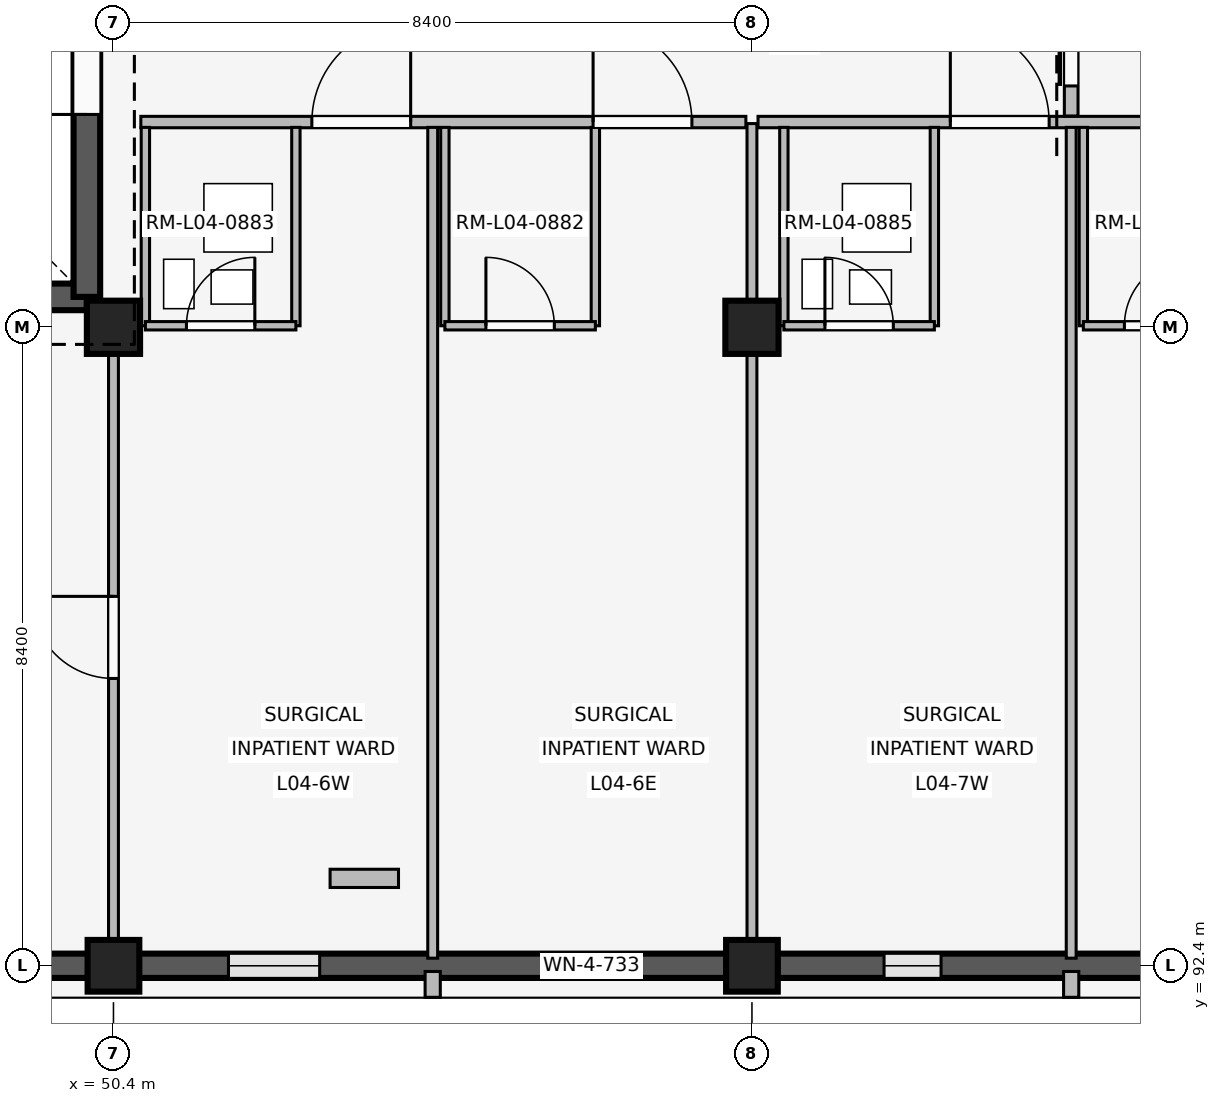
"""IFC4 building model, lengths in metres.
Left out: names, types, materials, properties, quantities, classifications, styles, units other than length and angle.
Written with IfcOpenShell. Run it as: python <this file> out.ifc"""

import sys

from ifc_helpers import new_model, si_unit, direction, frame, frame_2d, origin, origin_2d, place, context, subcontext, project, spatial, rectangle, extrude, element, fill, save


model = new_model("IFC4")
c1 = context("Model", 3, precision=1e-05, world=origin(), true_north=direction((0.0, 1.0)))
c2 = subcontext(c1, "Body", "Model", "MODEL_VIEW")
j1 = project(units=[si_unit("LENGTHUNIT", "METRE"), si_unit("PLANEANGLEUNIT", "RADIAN")], contexts=[c1])
p1 = place(None, origin())
s1 = spatial("IfcSite", under=j1, at=p1, CompositionType="ELEMENT")
p2 = place(p1, origin())
s2 = spatial("IfcBuilding", under=s1, at=p2, CompositionType="ELEMENT")
p3 = place(p2, frame((0.0, 0.0, 16.2)))
s3 = spatial("IfcBuildingStorey", under=s2, at=p3, CompositionType="ELEMENT", Elevation=16.2)
p4 = place(p3, frame((50.4, 92.4, 0.0), z_axis=(0.0, 0.0, 1.0), x_axis=(1.0, 0.0, 0.0)))
e1 = element("IfcColumn", 1, at=p4, inside=s3, PredefinedType="COLUMN", context=c2, shape_type="SweptSolid", body=[
    extrude(rectangle(XDim=0.68, YDim=0.68, at=origin_2d()), origin(), (0.0, 0.0, 1.0), 4.2),
])
p5 = place(p3, frame((50.4, 100.8, 0.0), z_axis=(0.0, 0.0, 1.0), x_axis=(1.0, 0.0, 0.0)))
e2 = element("IfcColumn", 2, at=p5, inside=s3, PredefinedType="COLUMN", context=c2, shape_type="SweptSolid", body=[
    extrude(rectangle(XDim=0.7, YDim=0.7, at=origin_2d()), origin(), (0.0, 0.0, 1.0), 4.2),
])
p6 = place(p3, frame((58.8, 92.4, 0.0), z_axis=(0.0, 0.0, 1.0), x_axis=(1.0, 0.0, 0.0)))
e3 = element("IfcColumn", 3, at=p6, inside=s3, PredefinedType="COLUMN", context=c2, shape_type="SweptSolid", body=[
    extrude(rectangle(XDim=0.68, YDim=0.68, at=origin_2d()), origin(), (0.0, 0.0, 1.0), 4.2),
])
p7 = place(p3, frame((58.8, 100.8, 0.0), z_axis=(0.0, 0.0, 1.0), x_axis=(1.0, 0.0, 0.0)))
e4 = element("IfcColumn", 4, at=p7, inside=s3, PredefinedType="COLUMN", context=c2, shape_type="SweptSolid", body=[
    extrude(rectangle(XDim=0.7, YDim=0.7, at=origin_2d()), origin(), (0.0, 0.0, 1.0), 4.2),
])
p8 = place(p3, frame((50.065, 92.4, 0.0), z_axis=(0.0, 0.0, 1.0), x_axis=(-1.0, 0.0, 0.0)))
e5 = element("IfcWall", 5, at=p8, inside=s3, PredefinedType="SOLIDWALL", context=c2, shape_type="SweptSolid", body=[
    extrude(rectangle(XDim=7.73, YDim=0.32, at=frame_2d((3.865, 0.0))), origin(), (0.0, 0.0, 1.0), 3.32),
])
p9 = place(p8, frame((1.103, 0.0, 0.85)))
e6 = element("IfcOpeningElement", 6, at=p9, cuts=e5, PredefinedType="OPENING", context=c2, shape_type="SweptSolid", body=[
    extrude(rectangle(XDim=1.35, YDim=1.55, at=frame_2d((0.675, 0.775))), frame((0.0, 0.17, 0.0), z_axis=(0.0, -1.0, 0.0), x_axis=(1.0, 0.0, 0.0)), (0.0, 0.0, 1.0), 0.34),
])
p10 = place(p8, frame((5.277, 0.0, 0.85)))
e7 = element("IfcOpeningElement", 7, at=p10, cuts=e5, PredefinedType="OPENING", context=c2, shape_type="SweptSolid", body=[
    extrude(rectangle(XDim=1.35, YDim=1.55, at=frame_2d((0.675, 0.775))), frame((0.0, 0.17, 0.0), z_axis=(0.0, -1.0, 0.0), x_axis=(1.0, 0.0, 0.0)), (0.0, 0.0, 1.0), 0.34),
])
p11 = place(p3, frame((58.465, 92.4, 0.0), z_axis=(0.0, 0.0, 1.0), x_axis=(-1.0, 0.0, 0.0)))
e8 = element("IfcWall", 8, at=p11, inside=s3, PredefinedType="SOLIDWALL", context=c2, shape_type="SweptSolid", body=[
    extrude(rectangle(XDim=7.73, YDim=0.32, at=frame_2d((3.865, 0.0))), origin(), (0.0, 0.0, 1.0), 3.32),
])
p12 = place(p11, frame((1.178, 0.0, 0.85)))
e9 = element("IfcOpeningElement", 9, at=p12, cuts=e8, PredefinedType="OPENING", context=c2, shape_type="SweptSolid", body=[
    extrude(rectangle(XDim=1.2, YDim=1.55, at=frame_2d((0.6, 0.775))), frame((0.0, 0.17, 0.0), z_axis=(0.0, -1.0, 0.0), x_axis=(1.0, 0.0, 0.0)), (0.0, 0.0, 1.0), 0.34),
])
p13 = place(p11, frame((5.352, 0.0, 0.85)))
e10 = element("IfcOpeningElement", 10, at=p13, cuts=e8, PredefinedType="OPENING", context=c2, shape_type="SweptSolid", body=[
    extrude(rectangle(XDim=1.2, YDim=1.55, at=frame_2d((0.6, 0.775))), frame((0.0, 0.17, 0.0), z_axis=(0.0, -1.0, 0.0), x_axis=(1.0, 0.0, 0.0)), (0.0, 0.0, 1.0), 0.34),
])
p14 = place(p3, frame((54.6, 92.325, 0.0), z_axis=(0.0, 0.0, 1.0), x_axis=(0.0, -1.0, 0.0)))
e11 = element("IfcWall", 11, at=p14, inside=s3, PredefinedType="ELEMENTEDWALL", context=c2, shape_type="SweptSolid", body=[
    extrude(rectangle(XDim=0.34, YDim=0.2, at=frame_2d((0.17, 0.0))), origin(), (0.0, 0.0, 1.0), 3.3),
])
p15 = place(p3, frame((66.865, 92.4, 0.0), z_axis=(0.0, 0.0, 1.0), x_axis=(-1.0, 0.0, 0.0)))
e12 = element("IfcWall", 12, at=p15, inside=s3, PredefinedType="SOLIDWALL", context=c2, shape_type="SweptSolid", body=[
    extrude(rectangle(XDim=7.73, YDim=0.32, at=frame_2d((3.865, 0.0))), origin(), (0.0, 0.0, 1.0), 3.32),
])
p16 = place(p15, frame((1.403, 0.0, 0.85)))
e13 = element("IfcOpeningElement", 13, at=p16, cuts=e12, PredefinedType="OPENING", context=c2, shape_type="SweptSolid", body=[
    extrude(rectangle(XDim=0.75, YDim=1.85, at=frame_2d((0.375, 0.925))), frame((0.0, 0.17, 0.0), z_axis=(0.0, -1.0, 0.0), x_axis=(1.0, 0.0, 0.0)), (0.0, 0.0, 1.0), 0.34),
])
p17 = place(p15, frame((5.577, 0.0, 0.85)))
e14 = element("IfcOpeningElement", 14, at=p17, cuts=e12, PredefinedType="OPENING", context=c2, shape_type="SweptSolid", body=[
    extrude(rectangle(XDim=0.75, YDim=1.85, at=frame_2d((0.375, 0.925))), frame((0.0, 0.17, 0.0), z_axis=(0.0, -1.0, 0.0), x_axis=(1.0, 0.0, 0.0)), (0.0, 0.0, 1.0), 0.34),
])
p18 = place(p3, frame((63.0, 92.325, 0.0), z_axis=(0.0, 0.0, 1.0), x_axis=(0.0, -1.0, 0.0)))
e15 = element("IfcWall", 15, at=p18, inside=s3, PredefinedType="ELEMENTEDWALL", context=c2, shape_type="SweptSolid", body=[
    extrude(rectangle(XDim=0.34, YDim=0.2, at=frame_2d((0.17, 0.0))), origin(), (0.0, 0.0, 1.0), 3.3),
])
p19 = place(p3, frame((42.55, 101.2, 0.0), z_axis=(0.0, 0.0, 1.0), x_axis=(1.0, 0.0, 0.0)))
e16 = element("IfcWall", 16, at=p19, inside=s3, PredefinedType="SHEAR", context=c2, shape_type="SweptSolid", body=[
    extrude(rectangle(XDim=7.5, YDim=0.35, at=frame_2d((3.75, 0.0))), origin(), (0.0, 0.0, 1.0), 3.92),
])
p20 = place(p19, frame((4.85, 0.0, 0.0)))
e17 = element("IfcOpeningElement", 17, at=p20, cuts=e16, PredefinedType="OPENING", context=c2, shape_type="SweptSolid", body=[
    extrude(rectangle(XDim=1.2, YDim=2.2, at=frame_2d((0.6, 1.1))), frame((0.0, 0.185, 0.0), z_axis=(0.0, -1.0, 0.0), x_axis=(1.0, 0.0, 0.0)), (0.0, 0.0, 1.0), 0.37),
])
p21 = place(p3, frame((50.05, 101.2, 0.0), z_axis=(0.0, 0.0, 1.0), x_axis=(0.0, 1.0, 0.0)))
e18 = element("IfcWall", 18, at=p21, inside=s3, PredefinedType="SHEAR", context=c2, shape_type="SweptSolid", body=[
    extrude(rectangle(XDim=7.55, YDim=0.35, at=frame_2d((3.775, 0.0))), origin(), (0.0, 0.0, 1.0), 3.92),
])
p22 = place(p21, frame((2.4, 0.0, 0.0)))
e19 = element("IfcOpeningElement", 19, at=p22, cuts=e18, PredefinedType="OPENING", context=c2, shape_type="SweptSolid", body=[
    extrude(rectangle(XDim=1.2, YDim=2.2, at=frame_2d((0.6, 1.1))), frame((0.0, 0.185, 0.0), z_axis=(0.0, -1.0, 0.0), x_axis=(1.0, 0.0, 0.0)), (0.0, 0.0, 1.0), 0.37),
])
p23 = place(p3, frame((50.4, 92.54, 0.0), z_axis=(0.0, 0.0, 1.0), x_axis=(0.0, 1.0, 0.0)))
e20 = element("IfcWall", 20, at=p23, inside=s3, PredefinedType="PARTITIONING", context=c2, shape_type="SweptSolid", body=[
    extrude(rectangle(XDim=8.21, YDim=0.13, at=frame_2d((4.105, 0.0))), origin(), (0.0, 0.0, 1.0), 3.3),
])
p24 = place(p23, frame((3.64, 0.0, 0.0)))
e21 = element("IfcOpeningElement", 21, at=p24, cuts=e20, PredefinedType="OPENING", context=c2, shape_type="SweptSolid", body=[
    extrude(rectangle(XDim=1.08, YDim=2.15, at=frame_2d((0.54, 1.075))), frame((0.0, 0.075, 0.0), z_axis=(0.0, -1.0, 0.0), x_axis=(1.0, 0.0, 0.0)), (0.0, 0.0, 1.0), 0.15),
])
p25 = place(p3, frame((50.76, 103.5, 0.0), z_axis=(0.0, 0.0, 1.0), x_axis=(1.0, 0.0, 0.0)))
e22 = element("IfcWall", 22, at=p25, inside=s3, PredefinedType="PARTITIONING", context=c2, shape_type="SweptSolid", body=[
    extrude(rectangle(XDim=7.96, YDim=0.15, at=frame_2d((3.98, 0.0))), origin(), (0.0, 0.0, 1.0), 3.3),
])
p26 = place(p25, frame((2.25, 0.0, 0.0)))
e23 = element("IfcOpeningElement", 23, at=p26, cuts=e22, PredefinedType="OPENING", context=c2, shape_type="SweptSolid", body=[
    extrude(rectangle(XDim=1.3, YDim=2.25, at=frame_2d((0.65, 1.125))), frame((0.0, 0.085, 0.0), z_axis=(0.0, -1.0, 0.0), x_axis=(1.0, 0.0, 0.0)), (0.0, 0.0, 1.0), 0.17),
])
p27 = place(p25, frame((5.95, 0.0, 0.0)))
e24 = element("IfcOpeningElement", 24, at=p27, cuts=e22, PredefinedType="OPENING", context=c2, shape_type="SweptSolid", body=[
    extrude(rectangle(XDim=1.3, YDim=2.25, at=frame_2d((0.65, 1.125))), frame((0.0, 0.085, 0.0), z_axis=(0.0, -1.0, 0.0), x_axis=(1.0, 0.0, 0.0)), (0.0, 0.0, 1.0), 0.17),
])
p28 = place(p3, frame((54.6, 92.5, 0.0), z_axis=(0.0, 0.0, 1.0), x_axis=(0.0, 1.0, 0.0)))
e25 = element("IfcWall", 25, at=p28, inside=s3, PredefinedType="PARTITIONING", context=c2, shape_type="SweptSolid", body=[
    extrude(rectangle(XDim=10.93, YDim=0.13, at=frame_2d((5.465, 0.0))), origin(), (0.0, 0.0, 1.0), 3.3),
])
for number, where, z_axis, x_axis in (
    (26, (50.82, 100.82, 0.0), (0.0, 0.0, 1.0), (0.0, 1.0, 0.0)),
    (27, (52.8, 100.82, 0.0), (0.0, 0.0, 1.0), (0.0, 1.0, 0.0)),
):
    element("IfcWall", number, at=place(p3, frame(where, z_axis=z_axis, x_axis=x_axis)), inside=s3, PredefinedType="PARTITIONING", context=c2, shape_type="SweptSolid", body=[
        extrude(rectangle(XDim=2.61, YDim=0.11, at=frame_2d((1.305, 0.0))), origin(), (0.0, 0.0, 1.0), 3.3),
    ])
p29 = place(p3, frame((50.82, 100.82, 0.0), z_axis=(0.0, 0.0, 1.0), x_axis=(1.0, 0.0, 0.0)))
e28 = element("IfcWall", 28, at=p29, inside=s3, PredefinedType="PARTITIONING", context=c2, shape_type="SweptSolid", body=[
    extrude(rectangle(XDim=1.98, YDim=0.11, at=frame_2d((0.99, 0.0))), origin(), (0.0, 0.0, 1.0), 3.3),
])
p30 = place(p29, frame((0.54, 0.0, 0.0)))
e29 = element("IfcOpeningElement", 29, at=p30, cuts=e28, PredefinedType="OPENING", context=c2, shape_type="SweptSolid", body=[
    extrude(rectangle(XDim=0.9, YDim=2.1, at=frame_2d((0.45, 1.05))), frame((0.0, 0.065, 0.0), z_axis=(0.0, -1.0, 0.0), x_axis=(1.0, 0.0, 0.0)), (0.0, 0.0, 1.0), 0.13),
])
for number, where, z_axis, x_axis in (
    (30, (54.76, 100.82, 0.0), (0.0, 0.0, 1.0), (0.0, 1.0, 0.0)),
    (31, (56.74, 100.82, 0.0), (0.0, 0.0, 1.0), (0.0, 1.0, 0.0)),
):
    element("IfcWall", number, at=place(p3, frame(where, z_axis=z_axis, x_axis=x_axis)), inside=s3, PredefinedType="PARTITIONING", context=c2, shape_type="SweptSolid", body=[
        extrude(rectangle(XDim=2.61, YDim=0.11, at=frame_2d((1.305, 0.0))), origin(), (0.0, 0.0, 1.0), 3.3),
    ])
p31 = place(p3, frame((54.76, 100.82, 0.0), z_axis=(0.0, 0.0, 1.0), x_axis=(1.0, 0.0, 0.0)))
e32 = element("IfcWall", 32, at=p31, inside=s3, PredefinedType="PARTITIONING", context=c2, shape_type="SweptSolid", body=[
    extrude(rectangle(XDim=1.98, YDim=0.11, at=frame_2d((0.99, 0.0))), origin(), (0.0, 0.0, 1.0), 3.3),
])
p32 = place(p31, frame((0.54, 0.0, 0.0)))
e33 = element("IfcOpeningElement", 33, at=p32, cuts=e32, PredefinedType="OPENING", context=c2, shape_type="SweptSolid", body=[
    extrude(rectangle(XDim=0.9, YDim=2.1, at=frame_2d((0.45, 1.05))), frame((0.0, 0.065, 0.0), z_axis=(0.0, -1.0, 0.0), x_axis=(1.0, 0.0, 0.0)), (0.0, 0.0, 1.0), 0.13),
])
p33 = place(p3, frame((53.25, 93.55, 0.0), z_axis=(0.0, 0.0, 1.0), x_axis=(1.0, 0.0, 0.0)))
e34 = element("IfcWall", 34, at=p33, inside=s3, PredefinedType="PLUMBINGWALL", context=c2, shape_type="SweptSolid", body=[
    extrude(rectangle(XDim=0.9, YDim=0.24, at=frame_2d((0.45, 0.0))), origin(), (0.0, 0.0, 1.0), 3.3),
])
p34 = place(p3, frame((58.8, 92.54, 0.0), z_axis=(0.0, 0.0, 1.0), x_axis=(0.0, 1.0, 0.0)))
e35 = element("IfcWall", 35, at=p34, inside=s3, PredefinedType="PARTITIONING", context=c2, shape_type="SweptSolid", body=[
    extrude(rectangle(XDim=10.94, YDim=0.13, at=frame_2d((5.47, 0.0))), origin(), (0.0, 0.0, 1.0), 3.3),
])
p35 = place(p3, frame((58.88, 103.5, 0.0), z_axis=(0.0, 0.0, 1.0), x_axis=(1.0, 0.0, 0.0)))
e36 = element("IfcWall", 36, at=p35, inside=s3, PredefinedType="PARTITIONING", context=c2, shape_type="SweptSolid", body=[
    extrude(rectangle(XDim=8.24, YDim=0.15, at=frame_2d((4.12, 0.0))), origin(), (0.0, 0.0, 1.0), 3.3),
])
p36 = place(p35, frame((2.53, 0.0, 0.0)))
e37 = element("IfcOpeningElement", 37, at=p36, cuts=e36, PredefinedType="OPENING", context=c2, shape_type="SweptSolid", body=[
    extrude(rectangle(XDim=1.3, YDim=2.25, at=frame_2d((0.65, 1.125))), frame((0.0, 0.085, 0.0), z_axis=(0.0, -1.0, 0.0), x_axis=(1.0, 0.0, 0.0)), (0.0, 0.0, 1.0), 0.17),
])
p37 = place(p35, frame((6.23, 0.0, 0.0)))
e38 = element("IfcOpeningElement", 38, at=p37, cuts=e36, PredefinedType="OPENING", context=c2, shape_type="SweptSolid", body=[
    extrude(rectangle(XDim=1.3, YDim=2.25, at=frame_2d((0.65, 1.125))), frame((0.0, 0.085, 0.0), z_axis=(0.0, -1.0, 0.0), x_axis=(1.0, 0.0, 0.0)), (0.0, 0.0, 1.0), 0.17),
])
p38 = place(p3, frame((63.0, 92.5, 0.0), z_axis=(0.0, 0.0, 1.0), x_axis=(0.0, 1.0, 0.0)))
e39 = element("IfcWall", 39, at=p38, inside=s3, PredefinedType="PARTITIONING", context=c2, shape_type="SweptSolid", body=[
    extrude(rectangle(XDim=10.93, YDim=0.13, at=frame_2d((5.465, 0.0))), origin(), (0.0, 0.0, 1.0), 3.3),
])
for number, where, z_axis, x_axis in (
    (40, (59.22, 100.82, 0.0), (0.0, 0.0, 1.0), (0.0, 1.0, 0.0)),
    (41, (61.2, 100.82, 0.0), (0.0, 0.0, 1.0), (0.0, 1.0, 0.0)),
):
    element("IfcWall", number, at=place(p3, frame(where, z_axis=z_axis, x_axis=x_axis)), inside=s3, PredefinedType="PARTITIONING", context=c2, shape_type="SweptSolid", body=[
        extrude(rectangle(XDim=2.61, YDim=0.11, at=frame_2d((1.305, 0.0))), origin(), (0.0, 0.0, 1.0), 3.3),
    ])
p39 = place(p3, frame((59.22, 100.82, 0.0), z_axis=(0.0, 0.0, 1.0), x_axis=(1.0, 0.0, 0.0)))
e42 = element("IfcWall", 42, at=p39, inside=s3, PredefinedType="PARTITIONING", context=c2, shape_type="SweptSolid", body=[
    extrude(rectangle(XDim=1.98, YDim=0.11, at=frame_2d((0.99, 0.0))), origin(), (0.0, 0.0, 1.0), 3.3),
])
p40 = place(p39, frame((0.54, 0.0, 0.0)))
e43 = element("IfcOpeningElement", 43, at=p40, cuts=e42, PredefinedType="OPENING", context=c2, shape_type="SweptSolid", body=[
    extrude(rectangle(XDim=0.9, YDim=2.1, at=frame_2d((0.45, 1.05))), frame((0.0, 0.065, 0.0), z_axis=(0.0, -1.0, 0.0), x_axis=(1.0, 0.0, 0.0)), (0.0, 0.0, 1.0), 0.13),
])
p41 = place(p3, frame((63.16, 100.82, 0.0), z_axis=(0.0, 0.0, 1.0), x_axis=(0.0, 1.0, 0.0)))
e44 = element("IfcWall", 44, at=p41, inside=s3, PredefinedType="PARTITIONING", context=c2, shape_type="SweptSolid", body=[
    extrude(rectangle(XDim=2.61, YDim=0.11, at=frame_2d((1.305, 0.0))), origin(), (0.0, 0.0, 1.0), 3.3),
])
p42 = place(p3, frame((63.16, 100.82, 0.0), z_axis=(0.0, 0.0, 1.0), x_axis=(1.0, 0.0, 0.0)))
e45 = element("IfcWall", 45, at=p42, inside=s3, PredefinedType="PARTITIONING", context=c2, shape_type="SweptSolid", body=[
    extrude(rectangle(XDim=1.98, YDim=0.11, at=frame_2d((0.99, 0.0))), origin(), (0.0, 0.0, 1.0), 3.3),
])
p43 = place(p42, frame((0.54, 0.0, 0.0)))
e46 = element("IfcOpeningElement", 46, at=p43, cuts=e45, PredefinedType="OPENING", context=c2, shape_type="SweptSolid", body=[
    extrude(rectangle(XDim=0.9, YDim=2.1, at=frame_2d((0.45, 1.05))), frame((0.0, 0.065, 0.0), z_axis=(0.0, -1.0, 0.0), x_axis=(1.0, 0.0, 0.0)), (0.0, 0.0, 1.0), 0.13),
])
p44 = place(p3, frame((63.0, 103.58, 0.0), z_axis=(0.0, 0.0, 1.0), x_axis=(0.0, 1.0, 0.0)))
e47 = element("IfcWall", 47, at=p44, inside=s3, PredefinedType="PARTITIONING", context=c2, shape_type="SweptSolid", body=[
    extrude(rectangle(XDim=2.84, YDim=0.18, at=frame_2d((1.42, 0.0))), origin(), (0.0, 0.0, 1.0), 3.3),
])
p45 = place(p44, frame((0.395, 0.0, 0.0)))
e48 = element("IfcOpeningElement", 48, at=p45, cuts=e47, PredefinedType="OPENING", context=c2, shape_type="SweptSolid", body=[
    extrude(rectangle(XDim=2.05, YDim=2.35, at=frame_2d((1.025, 1.175))), frame((0.0, 0.1, 0.0), z_axis=(0.0, -1.0, 0.0), x_axis=(1.0, 0.0, 0.0)), (0.0, 0.0, 1.0), 0.2),
])
p46 = place(p12, origin())
e49 = element("IfcWindow", 49, at=p46, inside=s3, PartitioningType="SINGLE_PANEL", PredefinedType="WINDOW", context=c2, shape_type="SweptSolid", body=[
    extrude(rectangle(XDim=1.2, YDim=1.55, at=frame_2d((0.6, 0.775))), frame((0.0, 0.03, 0.0), z_axis=(0.0, -1.0, 0.0), x_axis=(1.0, 0.0, 0.0)), (0.0, 0.0, 1.0), 0.06),
])
fill(e9, e49)
p47 = place(p13, origin())
e50 = element("IfcWindow", 50, at=p47, inside=s3, PartitioningType="SINGLE_PANEL", PredefinedType="WINDOW", context=c2, shape_type="SweptSolid", body=[
    extrude(rectangle(XDim=1.2, YDim=1.55, at=frame_2d((0.6, 0.775))), frame((0.0, 0.03, 0.0), z_axis=(0.0, -1.0, 0.0), x_axis=(1.0, 0.0, 0.0)), (0.0, 0.0, 1.0), 0.06),
])
fill(e10, e50)
p48 = place(p17, origin())
e51 = element("IfcWindow", 51, at=p48, inside=s3, PartitioningType="SINGLE_PANEL", PredefinedType="WINDOW", context=c2, shape_type="SweptSolid", body=[
    extrude(rectangle(XDim=0.75, YDim=1.85, at=frame_2d((0.375, 0.925))), frame((0.0, 0.03, 0.0), z_axis=(0.0, -1.0, 0.0), x_axis=(1.0, 0.0, 0.0)), (0.0, 0.0, 1.0), 0.06),
])
fill(e14, e51)
p49 = place(p22, origin())
e52 = element("IfcDoor", 52, at=p49, inside=s3, OperationType="SINGLE_SWING_LEFT", PredefinedType="DOOR", context=c2, shape_type="SweptSolid", body=[
    extrude(rectangle(XDim=1.2, YDim=2.2, at=frame_2d((0.6, 1.1))), frame((0.0, 0.025, 0.0), z_axis=(0.0, -1.0, 0.0), x_axis=(1.0, 0.0, 0.0)), (0.0, 0.0, 1.0), 0.05),
])
fill(e19, e52)
p50 = place(p24, origin())
e53 = element("IfcDoor", 53, at=p50, inside=s3, OperationType="SINGLE_SWING_RIGHT", PredefinedType="DOOR", context=c2, shape_type="SweptSolid", body=[
    extrude(rectangle(XDim=1.08, YDim=2.15, at=frame_2d((0.54, 1.075))), frame((0.0, 0.025, 0.0), z_axis=(0.0, -1.0, 0.0), x_axis=(1.0, 0.0, 0.0)), (0.0, 0.0, 1.0), 0.05),
])
fill(e21, e53)
p51 = place(p26, origin())
e54 = element("IfcDoor", 54, at=p51, inside=s3, OperationType="SINGLE_SWING_RIGHT", PredefinedType="DOOR", context=c2, shape_type="SweptSolid", body=[
    extrude(rectangle(XDim=1.3, YDim=2.25, at=frame_2d((0.65, 1.125))), frame((0.0, 0.025, 0.0), z_axis=(0.0, -1.0, 0.0), x_axis=(1.0, 0.0, 0.0)), (0.0, 0.0, 1.0), 0.05),
])
fill(e23, e54)
p52 = place(p27, origin())
e55 = element("IfcDoor", 55, at=p52, inside=s3, OperationType="SINGLE_SWING_LEFT", PredefinedType="DOOR", context=c2, shape_type="SweptSolid", body=[
    extrude(rectangle(XDim=1.3, YDim=2.25, at=frame_2d((0.65, 1.125))), frame((0.0, 0.025, 0.0), z_axis=(0.0, -1.0, 0.0), x_axis=(1.0, 0.0, 0.0)), (0.0, 0.0, 1.0), 0.05),
])
fill(e24, e55)
p53 = place(p30, origin())
e56 = element("IfcDoor", 56, at=p53, inside=s3, OperationType="SINGLE_SWING_RIGHT", PredefinedType="DOOR", context=c2, shape_type="SweptSolid", body=[
    extrude(rectangle(XDim=0.9, YDim=2.1, at=frame_2d((0.45, 1.05))), frame((0.0, 0.025, 0.0), z_axis=(0.0, -1.0, 0.0), x_axis=(1.0, 0.0, 0.0)), (0.0, 0.0, 1.0), 0.05),
])
fill(e29, e56)
p54 = place(p32, origin())
e57 = element("IfcDoor", 57, at=p54, inside=s3, OperationType="SINGLE_SWING_LEFT", PredefinedType="DOOR", context=c2, shape_type="SweptSolid", body=[
    extrude(rectangle(XDim=0.9, YDim=2.1, at=frame_2d((0.45, 1.05))), frame((0.0, 0.025, 0.0), z_axis=(0.0, -1.0, 0.0), x_axis=(1.0, 0.0, 0.0)), (0.0, 0.0, 1.0), 0.05),
])
fill(e33, e57)
p55 = place(p36, origin())
e58 = element("IfcDoor", 58, at=p55, inside=s3, OperationType="SINGLE_SWING_LEFT", PredefinedType="DOOR", context=c2, shape_type="SweptSolid", body=[
    extrude(rectangle(XDim=1.3, YDim=2.25, at=frame_2d((0.65, 1.125))), frame((0.0, 0.025, 0.0), z_axis=(0.0, -1.0, 0.0), x_axis=(1.0, 0.0, 0.0)), (0.0, 0.0, 1.0), 0.05),
])
fill(e37, e58)
p56 = place(p40, origin())
e59 = element("IfcDoor", 59, at=p56, inside=s3, OperationType="SINGLE_SWING_LEFT", PredefinedType="DOOR", context=c2, shape_type="SweptSolid", body=[
    extrude(rectangle(XDim=0.9, YDim=2.1, at=frame_2d((0.45, 1.05))), frame((0.0, 0.025, 0.0), z_axis=(0.0, -1.0, 0.0), x_axis=(1.0, 0.0, 0.0)), (0.0, 0.0, 1.0), 0.05),
])
fill(e43, e59)
p57 = place(p43, origin())
e60 = element("IfcDoor", 60, at=p57, inside=s3, OperationType="SINGLE_SWING_RIGHT", PredefinedType="DOOR", context=c2, shape_type="SweptSolid", body=[
    extrude(rectangle(XDim=0.9, YDim=2.1, at=frame_2d((0.45, 1.05))), frame((0.0, 0.025, 0.0), z_axis=(0.0, -1.0, 0.0), x_axis=(1.0, 0.0, 0.0)), (0.0, 0.0, 1.0), 0.05),
])
fill(e46, e60)
p58 = place(p45, origin())
e61 = element("IfcDoor", 61, at=p58, inside=s3, OperationType="SLIDING_TO_LEFT", PredefinedType="DOOR", context=c2, shape_type="SweptSolid", body=[
    extrude(rectangle(XDim=2.05, YDim=2.35, at=frame_2d((1.025, 1.175))), frame((0.0, 0.025, 0.0), z_axis=(0.0, -1.0, 0.0), x_axis=(1.0, 0.0, 0.0)), (0.0, 0.0, 1.0), 0.05),
])
fill(e48, e61)
save(model, sys.argv[1])
